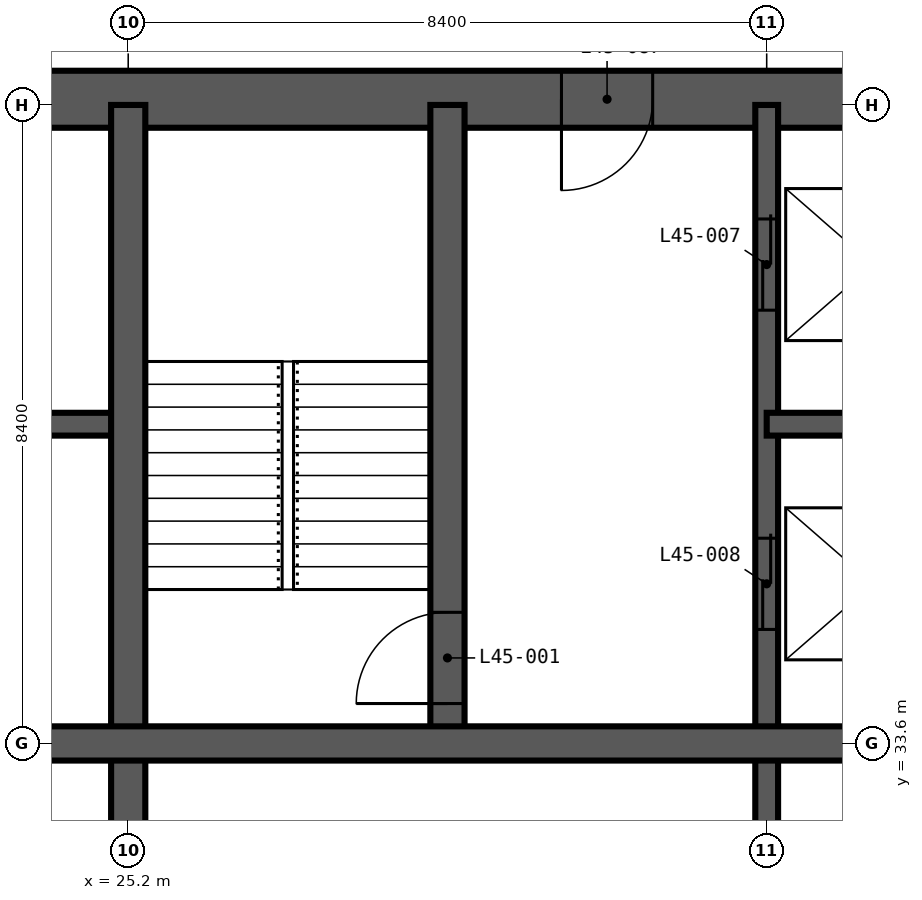
"""IFC4 building model, lengths in metres.
Left out: names, types, materials, properties, quantities, classifications, styles, units other than length and angle.
Written with IfcOpenShell. Run it as: python <this file> out.ifc"""

import sys

from ifc_helpers import new_model, si_unit, direction, frame, frame_2d, origin, place, context, subcontext, project, spatial, rectangle, extrude, element, fill, save


model = new_model("IFC4")
c1 = context("Model", 3, precision=1e-05, world=origin(), true_north=direction((0.0, 1.0)))
c2 = subcontext(c1, "Body", "Model", "MODEL_VIEW")
j1 = project(units=[si_unit("LENGTHUNIT", "METRE"), si_unit("PLANEANGLEUNIT", "RADIAN")], contexts=[c1])
p1 = place(None, origin())
s1 = spatial("IfcSite", under=j1, at=p1, CompositionType="ELEMENT")
p2 = place(p1, origin())
s2 = spatial("IfcBuilding", under=s1, at=p2, CompositionType="ELEMENT")
p3 = place(p2, frame((0.0, 0.0, 177.0)))
s3 = spatial("IfcBuildingStorey", under=s2, at=p3, CompositionType="ELEMENT", Elevation=177.0)
p4 = place(p3, frame((42.45, 42.075, -0.35), z_axis=(0.0, 0.0, 1.0), x_axis=(-1.0, 0.0, 0.0)))
e1 = element("IfcWall", 1, at=p4, inside=s3, PredefinedType="SHEAR", context=c2, shape_type="SweptSolid", body=[
    extrude(rectangle(XDim=26.1, YDim=0.75, at=frame_2d((13.05, 0.0))), origin(), (0.0, 0.0, 1.0), 3.6),
])
p5 = place(p4, frame((20.95, 0.0, 0.35)))
e2 = element("IfcOpeningElement", 2, at=p5, cuts=e1, PredefinedType="OPENING", context=c2, shape_type="SweptSolid", body=[
    extrude(rectangle(XDim=1.0, YDim=2.1, at=frame_2d((0.5, 1.05))), frame((0.0, 0.385, 0.0), z_axis=(0.0, -1.0, 0.0), x_axis=(1.0, 0.0, 0.0)), (0.0, 0.0, 1.0), 0.77),
])
p6 = place(p4, frame((10.35, 0.0, 0.35)))
e3 = element("IfcOpeningElement", 3, at=p6, cuts=e1, PredefinedType="OPENING", context=c2, shape_type="SweptSolid", body=[
    extrude(rectangle(XDim=1.2, YDim=2.2, at=frame_2d((0.6, 1.1))), frame((0.0, 0.385, 0.0), z_axis=(0.0, -1.0, 0.0), x_axis=(1.0, 0.0, 0.0)), (0.0, 0.0, 1.0), 0.77),
])
p7 = place(p3, frame((33.6, 16.8, -0.35), z_axis=(0.0, 0.0, 1.0), x_axis=(0.0, 1.0, 0.0)))
e4 = element("IfcWall", 4, at=p7, inside=s3, PredefinedType="SHEAR", context=c2, shape_type="SweptSolid", body=[
    extrude(rectangle(XDim=25.2, YDim=0.3, at=frame_2d((12.6, 0.0))), origin(), (0.0, 0.0, 1.0), 3.6),
])
p8 = place(p7, frame((22.5, 0.0, 0.35)))
e5 = element("IfcOpeningElement", 5, at=p8, cuts=e4, PredefinedType="OPENING", context=c2, shape_type="SweptSolid", body=[
    extrude(rectangle(XDim=1.2, YDim=2.2, at=frame_2d((0.6, 1.1))), frame((0.0, 0.16, 0.0), z_axis=(0.0, -1.0, 0.0), x_axis=(1.0, 0.0, 0.0)), (0.0, 0.0, 1.0), 0.32),
])
p9 = place(p7, frame((18.3, 0.0, 0.35)))
e6 = element("IfcOpeningElement", 6, at=p9, cuts=e4, PredefinedType="OPENING", context=c2, shape_type="SweptSolid", body=[
    extrude(rectangle(XDim=1.2, YDim=2.2, at=frame_2d((0.6, 1.1))), frame((0.0, 0.16, 0.0), z_axis=(0.0, -1.0, 0.0), x_axis=(1.0, 0.0, 0.0)), (0.0, 0.0, 1.0), 0.32),
])
p10 = place(p7, frame((12.1, 0.0, 0.35)))
e7 = element("IfcOpeningElement", 7, at=p10, cuts=e4, PredefinedType="OPENING", context=c2, shape_type="SweptSolid", body=[
    extrude(rectangle(XDim=1.0, YDim=2.1, at=frame_2d((0.5, 1.05))), frame((0.0, 0.16, 0.0), z_axis=(0.0, -1.0, 0.0), x_axis=(1.0, 0.0, 0.0)), (0.0, 0.0, 1.0), 0.32),
])
p11 = place(p3, frame((16.8, 37.8, -0.35), z_axis=(0.0, 0.0, 1.0), x_axis=(1.0, 0.0, 0.0)))
e8 = element("IfcWall", 8, at=p11, inside=s3, PredefinedType="SHEAR", context=c2, shape_type="SweptSolid", body=[
    extrude(rectangle(XDim=8.4, YDim=0.3, at=frame_2d((4.2, 0.0))), origin(), (0.0, 0.0, 1.0), 3.6),
])
p12 = place(p3, frame((33.6, 37.8, -0.35), z_axis=(0.0, 0.0, 1.0), x_axis=(1.0, 0.0, 0.0)))
e9 = element("IfcWall", 9, at=p12, inside=s3, PredefinedType="SHEAR", context=c2, shape_type="SweptSolid", body=[
    extrude(rectangle(XDim=2.8, YDim=0.3, at=frame_2d((1.4, 0.0))), origin(), (0.0, 0.0, 1.0), 3.6),
])
p13 = place(p3, frame((25.2, 16.8, -0.35), z_axis=(0.0, 0.0, 1.0), x_axis=(0.0, 1.0, 0.0)))
e10 = element("IfcWall", 10, at=p13, inside=s3, PredefinedType="SHEAR", context=c2, shape_type="SweptSolid", body=[
    extrude(rectangle(XDim=25.2, YDim=0.45, at=frame_2d((12.6, 0.0))), origin(), (0.0, 0.0, 1.0), 3.6),
])
p14 = place(p3, frame((29.4, 33.6, -0.35), z_axis=(0.0, 0.0, 1.0), x_axis=(0.0, 1.0, 0.0)))
e11 = element("IfcWall", 11, at=p14, inside=s3, PredefinedType="SHEAR", context=c2, shape_type="SweptSolid", body=[
    extrude(rectangle(XDim=8.4, YDim=0.45, at=frame_2d((4.2, 0.0))), origin(), (0.0, 0.0, 1.0), 3.6),
])
p15 = place(p14, frame((0.525, 0.0, 0.35)))
e12 = element("IfcOpeningElement", 12, at=p15, cuts=e11, PredefinedType="OPENING", context=c2, shape_type="SweptSolid", body=[
    extrude(rectangle(XDim=1.2, YDim=2.2, at=frame_2d((0.6, 1.1))), frame((0.0, 0.235, 0.0), z_axis=(0.0, -1.0, 0.0), x_axis=(1.0, 0.0, 0.0)), (0.0, 0.0, 1.0), 0.47),
])
p16 = place(p3, frame((16.8, 33.6, -0.35), z_axis=(0.0, 0.0, 1.0), x_axis=(1.0, 0.0, 0.0)))
e13 = element("IfcWall", 13, at=p16, inside=s3, PredefinedType="SHEAR", context=c2, shape_type="SweptSolid", body=[
    extrude(rectangle(XDim=25.2, YDim=0.45, at=frame_2d((12.6, 0.0))), origin(), (0.0, 0.0, 1.0), 3.6),
])
p17 = place(p15, origin())
e14 = element("IfcDoor", 14, at=p17, inside=s3, OperationType="SINGLE_SWING_LEFT", PredefinedType="DOOR", context=c2, shape_type="SweptSolid", body=[
    extrude(rectangle(XDim=1.2, YDim=2.2, at=frame_2d((0.6, 1.1))), frame((0.0, 0.025, 0.0), z_axis=(0.0, -1.0, 0.0), x_axis=(1.0, 0.0, 0.0)), (0.0, 0.0, 1.0), 0.05),
])
fill(e12, e14)
p18 = place(p8, origin())
e15 = element("IfcDoor", 15, at=p18, inside=s3, OperationType="DOUBLE_DOOR_SLIDING", PredefinedType="DOOR", context=c2, shape_type="SweptSolid", body=[
    extrude(rectangle(XDim=1.2, YDim=2.2, at=frame_2d((0.6, 1.1))), frame((0.0, 0.025, 0.0), z_axis=(0.0, -1.0, 0.0), x_axis=(1.0, 0.0, 0.0)), (0.0, 0.0, 1.0), 0.05),
])
fill(e5, e15)
p19 = place(p9, origin())
e16 = element("IfcDoor", 16, at=p19, inside=s3, OperationType="DOUBLE_DOOR_SLIDING", PredefinedType="DOOR", context=c2, shape_type="SweptSolid", body=[
    extrude(rectangle(XDim=1.2, YDim=2.2, at=frame_2d((0.6, 1.1))), frame((0.0, 0.025, 0.0), z_axis=(0.0, -1.0, 0.0), x_axis=(1.0, 0.0, 0.0)), (0.0, 0.0, 1.0), 0.05),
])
fill(e6, e16)
p20 = place(p6, origin())
e17 = element("IfcDoor", 17, at=p20, inside=s3, OperationType="SINGLE_SWING_RIGHT", PredefinedType="DOOR", context=c2, shape_type="SweptSolid", body=[
    extrude(rectangle(XDim=1.2, YDim=2.2, at=frame_2d((0.6, 1.1))), frame((0.0, 0.025, 0.0), z_axis=(0.0, -1.0, 0.0), x_axis=(1.0, 0.0, 0.0)), (0.0, 0.0, 1.0), 0.05),
])
fill(e3, e17)
save(model, sys.argv[1])
